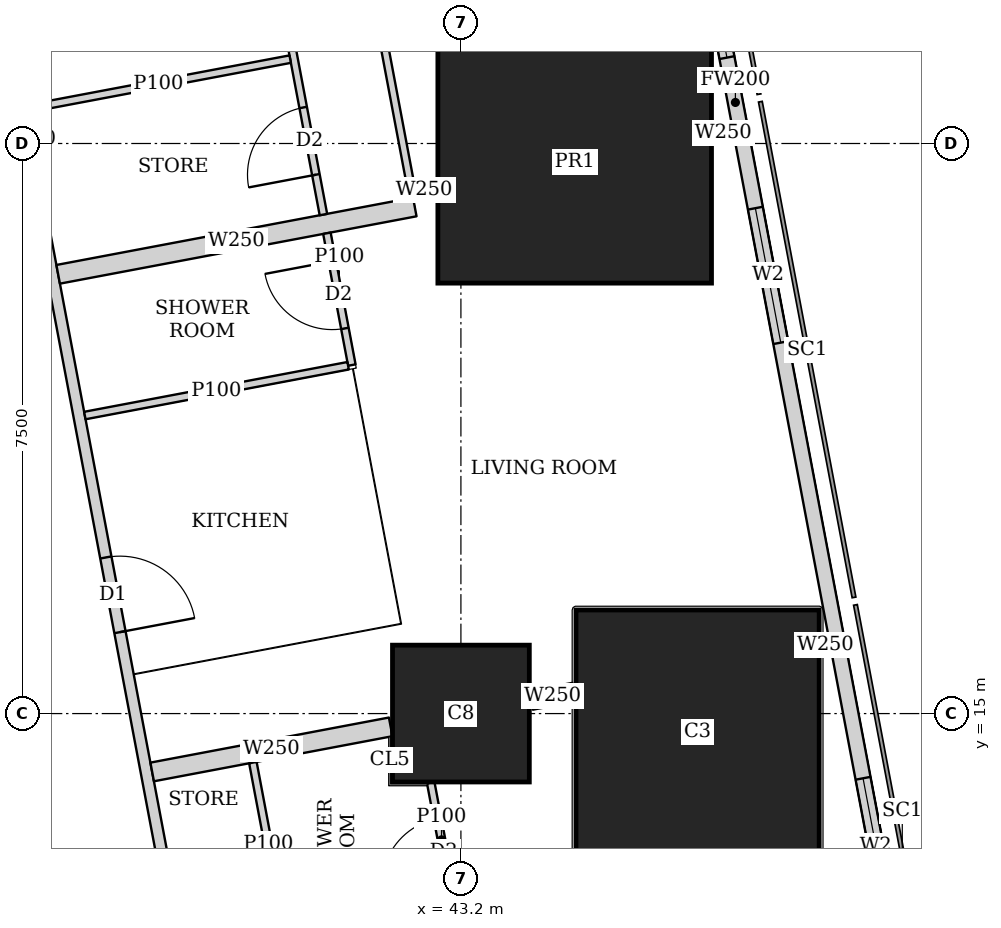
"""IFC4 building model, lengths in metres.
Left out: names, types, materials, properties, quantities, classifications, styles, units other than length and angle.
Written with IfcOpenShell. Run it as: python <this file> out.ifc"""

import sys

from ifc_helpers import new_model, si_unit, direction, frame, frame_2d, origin, origin_2d, place, context, subcontext, project, spatial, rectangle, extrude, element, fill, save


model = new_model("IFC4")
c1 = context("Model", 3, precision=1e-05, world=origin(), true_north=direction((0.0, 1.0)))
c2 = subcontext(c1, "Body", "Model", "MODEL_VIEW")
j1 = project(units=[si_unit("LENGTHUNIT", "METRE"), si_unit("PLANEANGLEUNIT", "RADIAN")], contexts=[c1])
p1 = place(None, origin())
s1 = spatial("IfcSite", under=j1, at=p1, CompositionType="ELEMENT")
p2 = place(p1, origin())
s2 = spatial("IfcBuilding", under=s1, at=p2, CompositionType="ELEMENT")
p3 = place(p2, frame((0.0, 0.0, 20.0)))
s3 = spatial("IfcBuildingStorey", under=s2, at=p3, CompositionType="ELEMENT", Elevation=20.0)
p4 = place(p3, frame((43.2, 15.0, 0.0), z_axis=(0.0, 0.0, 1.0), x_axis=(1.0, 0.0, 0.0)))
e1 = element("IfcColumn", 1, at=p4, inside=s3, PredefinedType="COLUMN", context=c2, shape_type="SweptSolid", body=[
    extrude(rectangle(XDim=1.8, YDim=1.8, at=origin_2d()), origin(), (0.0, 0.0, 1.0), 3.75),
])
p5 = place(p3, frame((46.314, 14.763, 0.0), z_axis=(0.0, 0.0, 1.0), x_axis=(1.0, 0.0, 0.0)))
e2 = element("IfcColumn", 2, at=p5, inside=s3, PredefinedType="COLUMN", context=c2, shape_type="SweptSolid", body=[
    extrude(rectangle(XDim=3.2, YDim=3.2, at=origin_2d()), origin(), (0.0, 0.0, 1.0), 3.75),
])
p6 = place(p3, frame((44.697, 22.263, 0.0), z_axis=(0.0, 0.0, 1.0), x_axis=(1.0, 0.0, 0.0)))
e3 = element("IfcColumn", 3, at=p6, inside=s3, PredefinedType="COLUMN", context=c2, shape_type="SweptSolid", body=[
    extrude(rectangle(XDim=3.6, YDim=3.2, at=origin_2d()), origin(), (0.0, 0.0, 1.0), 3.75),
])
p7 = place(p3, frame((50.653, 2.703, 0.0), z_axis=(0.0, 0.0, 1.0), x_axis=(-0.185612026696, 0.982623109613, 0.0)))
e4 = element("IfcWall", 4, at=p7, inside=s3, PredefinedType="SOLIDWALL", context=c2, shape_type="SweptSolid", body=[
    extrude(rectangle(XDim=41.393, YDim=0.2, at=frame_2d((20.697, 0.0))), origin(), (0.0, 0.0, 1.0), 3.5),
])
p8 = place(p7, frame((1.633, 0.0, 0.9)))
e5 = element("IfcOpeningElement", 5, at=p8, cuts=e4, PredefinedType="OPENING", context=c2, shape_type="SweptSolid", body=[
    extrude(rectangle(XDim=1.8, YDim=1.5, at=frame_2d((0.9, 0.75))), frame((0.0, 0.11, 0.0), z_axis=(0.0, -1.0, 0.0), x_axis=(1.0, 0.0, 0.0)), (0.0, 0.0, 1.0), 0.22),
])
p9 = place(p7, frame((6.032, 0.0, 0.9)))
e6 = element("IfcOpeningElement", 6, at=p9, cuts=e4, PredefinedType="OPENING", context=c2, shape_type="SweptSolid", body=[
    extrude(rectangle(XDim=1.8, YDim=1.5, at=frame_2d((0.9, 0.75))), frame((0.0, 0.11, 0.0), z_axis=(0.0, -1.0, 0.0), x_axis=(1.0, 0.0, 0.0)), (0.0, 0.0, 1.0), 0.22),
])
p10 = place(p7, frame((9.848, 0.0, 0.9)))
e7 = element("IfcOpeningElement", 7, at=p10, cuts=e4, PredefinedType="OPENING", context=c2, shape_type="SweptSolid", body=[
    extrude(rectangle(XDim=1.8, YDim=1.5, at=frame_2d((0.9, 0.75))), frame((0.0, 0.11, 0.0), z_axis=(0.0, -1.0, 0.0), x_axis=(1.0, 0.0, 0.0)), (0.0, 0.0, 1.0), 0.22),
])
p11 = place(p7, frame((17.481, 0.0, 0.9)))
e8 = element("IfcOpeningElement", 8, at=p11, cuts=e4, PredefinedType="OPENING", context=c2, shape_type="SweptSolid", body=[
    extrude(rectangle(XDim=1.8, YDim=1.5, at=frame_2d((0.9, 0.75))), frame((0.0, 0.11, 0.0), z_axis=(0.0, -1.0, 0.0), x_axis=(1.0, 0.0, 0.0)), (0.0, 0.0, 1.0), 0.22),
])
p12 = place(p7, frame((21.297, 0.0, 0.9)))
e9 = element("IfcOpeningElement", 9, at=p12, cuts=e4, PredefinedType="OPENING", context=c2, shape_type="SweptSolid", body=[
    extrude(rectangle(XDim=1.8, YDim=1.5, at=frame_2d((0.9, 0.75))), frame((0.0, 0.11, 0.0), z_axis=(0.0, -1.0, 0.0), x_axis=(1.0, 0.0, 0.0)), (0.0, 0.0, 1.0), 0.22),
])
p13 = place(p7, frame((25.113, 0.0, 0.9)))
e10 = element("IfcOpeningElement", 10, at=p13, cuts=e4, PredefinedType="OPENING", context=c2, shape_type="SweptSolid", body=[
    extrude(rectangle(XDim=1.8, YDim=1.5, at=frame_2d((0.9, 0.75))), frame((0.0, 0.11, 0.0), z_axis=(0.0, -1.0, 0.0), x_axis=(1.0, 0.0, 0.0)), (0.0, 0.0, 1.0), 0.22),
])
p14 = place(p7, frame((28.93, 0.0, 0.9)))
e11 = element("IfcOpeningElement", 11, at=p14, cuts=e4, PredefinedType="OPENING", context=c2, shape_type="SweptSolid", body=[
    extrude(rectangle(XDim=1.8, YDim=1.5, at=frame_2d((0.9, 0.75))), frame((0.0, 0.11, 0.0), z_axis=(0.0, -1.0, 0.0), x_axis=(1.0, 0.0, 0.0)), (0.0, 0.0, 1.0), 0.22),
])
p15 = place(p7, frame((32.746, 0.0, 0.9)))
e12 = element("IfcOpeningElement", 12, at=p15, cuts=e4, PredefinedType="OPENING", context=c2, shape_type="SweptSolid", body=[
    extrude(rectangle(XDim=1.8, YDim=1.5, at=frame_2d((0.9, 0.75))), frame((0.0, 0.11, 0.0), z_axis=(0.0, -1.0, 0.0), x_axis=(1.0, 0.0, 0.0)), (0.0, 0.0, 1.0), 0.22),
])
p16 = place(p7, frame((36.481, 0.0, 0.9)))
e13 = element("IfcOpeningElement", 13, at=p16, cuts=e4, PredefinedType="OPENING", context=c2, shape_type="SweptSolid", body=[
    extrude(rectangle(XDim=1.8, YDim=1.5, at=frame_2d((0.9, 0.75))), frame((0.0, 0.11, 0.0), z_axis=(0.0, -1.0, 0.0), x_axis=(1.0, 0.0, 0.0)), (0.0, 0.0, 1.0), 0.22),
])
p17 = place(p3, frame((33.755, 42.325, 0.0), z_axis=(0.0, 0.0, 1.0), x_axis=(0.185611461091, -0.982623216453, 0.0)))
e14 = element("IfcWall", 14, at=p17, inside=s3, PredefinedType="SOLIDWALL", context=c2, shape_type="SweptSolid", body=[
    extrude(rectangle(XDim=40.241, YDim=0.15, at=frame_2d((20.121, 0.0))), origin(), (0.0, 0.0, 1.0), 2.5),
])
p18 = place(p17, frame((7.325, 0.0, 0.0)))
e15 = element("IfcOpeningElement", 15, at=p18, cuts=e14, PredefinedType="OPENING", context=c2, shape_type="SweptSolid", body=[
    extrude(rectangle(XDim=1.0, YDim=2.1, at=frame_2d((0.5, 1.05))), frame((0.0, 0.085, 0.0), z_axis=(0.0, -1.0, 0.0), x_axis=(1.0, 0.0, 0.0)), (0.0, 0.0, 1.0), 0.17),
])
p19 = place(p17, frame((11.902, 0.0, 0.0)))
e16 = element("IfcOpeningElement", 16, at=p19, cuts=e14, PredefinedType="OPENING", context=c2, shape_type="SweptSolid", body=[
    extrude(rectangle(XDim=1.0, YDim=2.1, at=frame_2d((0.5, 1.05))), frame((0.0, 0.085, 0.0), z_axis=(0.0, -1.0, 0.0), x_axis=(1.0, 0.0, 0.0)), (0.0, 0.0, 1.0), 0.17),
])
p20 = place(p17, frame((25.718, 0.0, 0.0)))
e17 = element("IfcOpeningElement", 17, at=p20, cuts=e14, PredefinedType="OPENING", context=c2, shape_type="SweptSolid", body=[
    extrude(rectangle(XDim=1.0, YDim=2.1, at=frame_2d((0.5, 1.05))), frame((0.0, 0.085, 0.0), z_axis=(0.0, -1.0, 0.0), x_axis=(1.0, 0.0, 0.0)), (0.0, 0.0, 1.0), 0.17),
])
p21 = place(p17, frame((31.788, 0.0, 0.0)))
e18 = element("IfcOpeningElement", 18, at=p21, cuts=e14, PredefinedType="OPENING", context=c2, shape_type="SweptSolid", body=[
    extrude(rectangle(XDim=1.0, YDim=2.1, at=frame_2d((0.5, 1.05))), frame((0.0, 0.085, 0.0), z_axis=(0.0, -1.0, 0.0), x_axis=(1.0, 0.0, 0.0)), (0.0, 0.0, 1.0), 0.17),
])
p22 = place(p3, frame((41.157, 29.273, 0.0), z_axis=(0.0, 0.0, 1.0), x_axis=(0.18542464283, -0.982658486877, 0.0)))
e19 = element("IfcWall", 19, at=p22, inside=s3, PredefinedType="PARTITIONING", context=c2, shape_type="SweptSolid", body=[
    extrude(rectangle(XDim=7.421, YDim=0.1, at=frame_2d((3.71, 0.0))), origin(), (0.0, 0.0, 1.0), 2.5),
])
p23 = place(p22, frame((1.4, 0.0, 0.0)))
e20 = element("IfcOpeningElement", 20, at=p23, cuts=e19, PredefinedType="OPENING", context=c2, shape_type="SweptSolid", body=[
    extrude(rectangle(XDim=0.9, YDim=2.1, at=frame_2d((0.45, 1.05))), frame((0.0, 0.06, 0.0), z_axis=(0.0, -1.0, 0.0), x_axis=(1.0, 0.0, 0.0)), (0.0, 0.0, 1.0), 0.12),
])
p24 = place(p22, frame((4.126, 0.0, 0.0)))
e21 = element("IfcOpeningElement", 21, at=p24, cuts=e19, PredefinedType="OPENING", context=c2, shape_type="SweptSolid", body=[
    extrude(rectangle(XDim=0.9, YDim=2.1, at=frame_2d((0.45, 1.05))), frame((0.0, 0.06, 0.0), z_axis=(0.0, -1.0, 0.0), x_axis=(1.0, 0.0, 0.0)), (0.0, 0.0, 1.0), 0.12),
])
p25 = place(p3, frame((39.997, 28.942, 0.0), z_axis=(0.0, 0.0, 1.0), x_axis=(0.185686318797, -0.982609073341, 0.0)))
e22 = element("IfcWall", 22, at=p25, inside=s3, PredefinedType="PARTITIONING", context=c2, shape_type="SweptSolid", body=[
    extrude(rectangle(XDim=7.508, YDim=0.1, at=frame_2d((3.754, 0.0))), origin(), (0.0, 0.0, 1.0), 2.5),
])
p26 = place(p25, frame((0.576, 0.0, 0.0)))
e23 = element("IfcOpeningElement", 23, at=p26, cuts=e22, PredefinedType="OPENING", context=c2, shape_type="SweptSolid", body=[
    extrude(rectangle(XDim=0.9, YDim=2.1, at=frame_2d((0.45, 1.05))), frame((0.0, 0.06, 0.0), z_axis=(0.0, -1.0, 0.0), x_axis=(1.0, 0.0, 0.0)), (0.0, 0.0, 1.0), 0.12),
])
p27 = place(p25, frame((4.166, 0.0, 0.0)))
e24 = element("IfcOpeningElement", 24, at=p27, cuts=e22, PredefinedType="OPENING", context=c2, shape_type="SweptSolid", body=[
    extrude(rectangle(XDim=0.9, YDim=2.1, at=frame_2d((0.45, 1.05))), frame((0.0, 0.06, 0.0), z_axis=(0.0, -1.0, 0.0), x_axis=(1.0, 0.0, 0.0)), (0.0, 0.0, 1.0), 0.12),
])
p28 = place(p25, frame((2.483, 0.0, 0.0)))
e25 = element("IfcOpeningElement", 25, at=p28, cuts=e22, PredefinedType="OPENING", context=c2, shape_type="SweptSolid", body=[
    extrude(rectangle(XDim=0.9, YDim=2.1, at=frame_2d((0.45, 1.05))), frame((0.0, 0.06, 0.0), z_axis=(0.0, -1.0, 0.0), x_axis=(1.0, 0.0, 0.0)), (0.0, 0.0, 1.0), 0.12),
])
p29 = place(p25, frame((6.074, 0.0, 0.0)))
e26 = element("IfcOpeningElement", 26, at=p29, cuts=e22, PredefinedType="OPENING", context=c2, shape_type="SweptSolid", body=[
    extrude(rectangle(XDim=0.9, YDim=2.1, at=frame_2d((0.45, 1.05))), frame((0.0, 0.06, 0.0), z_axis=(0.0, -1.0, 0.0), x_axis=(1.0, 0.0, 0.0)), (0.0, 0.0, 1.0), 0.12),
])
p30 = place(p3, frame((40.954, 23.61, 0.0), z_axis=(0.0, 0.0, 1.0), x_axis=(-0.982638553676, -0.185530247748, 0.0)))
e27 = element("IfcWall", 27, at=p30, inside=s3, PredefinedType="PARTITIONING", context=c2, shape_type="SweptSolid", body=[
    extrude(rectangle(XDim=3.525, YDim=0.1, at=frame_2d((1.763, 0.0))), origin(), (0.0, 0.0, 1.0), 2.5),
])
p31 = place(p3, frame((41.437, 21.319, 0.0), z_axis=(0.0, 0.0, 1.0), x_axis=(0.185783379659, -0.98259072652, 0.0)))
e28 = element("IfcWall", 28, at=p31, inside=s3, PredefinedType="PARTITIONING", context=c2, shape_type="SweptSolid", body=[
    extrude(rectangle(XDim=1.765, YDim=0.1, at=frame_2d((0.882, 0.0))), origin(), (0.0, 0.0, 1.0), 3.5),
])
p32 = place(p31, frame((0.374, 0.0, 0.0)))
e29 = element("IfcOpeningElement", 29, at=p32, cuts=e28, PredefinedType="OPENING", context=c2, shape_type="SweptSolid", body=[
    extrude(rectangle(XDim=0.9, YDim=2.1, at=frame_2d((0.45, 1.05))), frame((0.0, 0.06, 0.0), z_axis=(0.0, -1.0, 0.0), x_axis=(1.0, 0.0, 0.0)), (0.0, 0.0, 1.0), 0.12),
])
p33 = place(p3, frame((41.716, 19.576, 0.0), z_axis=(0.0, 0.0, 1.0), x_axis=(-0.982588017646, -0.185797706064, 0.0)))
e30 = element("IfcWall", 30, at=p33, inside=s3, PredefinedType="PARTITIONING", context=c2, shape_type="SweptSolid", body=[
    extrude(rectangle(XDim=3.525, YDim=0.1, at=frame_2d((1.763, 0.0))), origin(), (0.0, 0.0, 1.0), 3.5),
])
p34 = place(p3, frame((46.782, 22.657, 0.0), z_axis=(0.0, 0.0, 1.0), x_axis=(-0.982104607121, -0.188336243648, 0.0)))
e31 = element("IfcWall", 31, at=p34, inside=s3, PredefinedType="SOLIDWALL", context=c2, shape_type="SweptSolid", body=[
    extrude(rectangle(XDim=0.266, YDim=0.25, at=frame_2d((0.133, 0.0))), origin(), (0.0, 0.0, 1.0), 3.5),
])
p35 = place(p3, frame((42.873, 21.918, 0.0), z_axis=(0.0, 0.0, 1.0), x_axis=(-0.982431406936, -0.186624035603, 0.0)))
e32 = element("IfcWall", 32, at=p35, inside=s3, PredefinedType="SOLIDWALL", context=c2, shape_type="SweptSolid", body=[
    extrude(rectangle(XDim=0.322, YDim=0.25, at=frame_2d((0.161, 0.0))), origin(), (0.0, 0.0, 1.0), 2.5),
])
p36 = place(p3, frame((42.593, 21.665, 0.0), z_axis=(0.0, 0.0, 1.0), x_axis=(-0.982635807605, -0.185544791394, 0.0)))
e33 = element("IfcWall", 33, at=p36, inside=s3, PredefinedType="SOLIDWALL", context=c2, shape_type="SweptSolid", body=[
    extrude(rectangle(XDim=4.775, YDim=0.25, at=frame_2d((2.388, 0.0))), origin(), (0.0, 0.0, 1.0), 2.5),
])
p37 = place(p3, frame((42.803, 14.09, 0.0), z_axis=(0.0, 0.0, 1.0), x_axis=(0.185608486942, -0.982623778246, 0.0)))
e34 = element("IfcWall", 34, at=p37, inside=s3, PredefinedType="PARTITIONING", context=c2, shape_type="SweptSolid", body=[
    extrude(rectangle(XDim=1.53, YDim=0.1, at=frame_2d((0.765, 0.0))), origin(), (0.0, 0.0, 1.0), 3.5),
])
p38 = place(p37, frame((0.48, 0.0, 0.0)))
e35 = element("IfcOpeningElement", 35, at=p38, cuts=e34, PredefinedType="OPENING", context=c2, shape_type="SweptSolid", body=[
    extrude(rectangle(XDim=0.9, YDim=2.1, at=frame_2d((0.45, 1.05))), frame((0.0, 0.06, 0.0), z_axis=(0.0, -1.0, 0.0), x_axis=(1.0, 0.0, 0.0)), (0.0, 0.0, 1.0), 0.12),
])
p39 = place(p3, frame((40.463, 14.355, 0.0), z_axis=(0.0, 0.0, 1.0), x_axis=(0.185760900029, -0.98259497659, 0.0)))
e36 = element("IfcWall", 36, at=p39, inside=s3, PredefinedType="PARTITIONING", context=c2, shape_type="SweptSolid", body=[
    extrude(rectangle(XDim=2.192, YDim=0.1, at=frame_2d((1.096, 0.0))), origin(), (0.0, 0.0, 1.0), 3.5),
])
p40 = place(p3, frame((48.055, 15.917, 0.0), z_axis=(0.0, 0.0, 1.0), x_axis=(-0.98280243359, -0.184660164975, 0.0)))
e37 = element("IfcWall", 37, at=p40, inside=s3, PredefinedType="SOLIDWALL", context=c2, shape_type="SweptSolid", body=[
    extrude(rectangle(XDim=0.119, YDim=0.25, at=frame_2d((0.06, 0.0))), origin(), (0.0, 0.0, 1.0), 3.5),
])
p41 = place(p3, frame((44.69, 15.281, 0.0), z_axis=(0.0, 0.0, 1.0), x_axis=(-0.982612073204, -0.185670443513, 0.0)))
e38 = element("IfcWall", 38, at=p41, inside=s3, PredefinedType="SOLIDWALL", context=c2, shape_type="SweptSolid", body=[
    extrude(rectangle(XDim=0.576, YDim=0.25, at=frame_2d((0.288, 0.0))), origin(), (0.0, 0.0, 1.0), 2.05),
])
p42 = place(p3, frame((42.276, 14.825, 0.0), z_axis=(0.0, 0.0, 1.0), x_axis=(-0.982607211054, -0.185696173318, 0.0)))
e39 = element("IfcWall", 39, at=p42, inside=s3, PredefinedType="SOLIDWALL", context=c2, shape_type="SweptSolid", body=[
    extrude(rectangle(XDim=3.194, YDim=0.25, at=frame_2d((1.597, 0.0))), origin(), (0.0, 0.0, 1.0), 3.5),
])
p43 = place(p3, frame((37.9, 10.413, 0.0), z_axis=(0.0, 0.0, 1.0), x_axis=(-0.185527510388, 0.982639070508, 0.0)))
e40 = element("IfcWall", 40, at=p43, inside=s3, PredefinedType="PARTITIONING", context=c2, shape_type="SweptSolid", body=[
    extrude(rectangle(XDim=5.056, YDim=0.125, at=frame_2d((2.528, 0.0))), origin(), (0.0, 0.0, 1.0), 3.5),
])
p44 = place(p43, frame((0.708, 0.0, 0.0)))
e41 = element("IfcOpeningElement", 41, at=p44, cuts=e40, PredefinedType="OPENING", context=c2, shape_type="SweptSolid", body=[
    extrude(rectangle(XDim=1.0, YDim=2.1, at=frame_2d((0.5, 1.05))), frame((0.0, 0.073, 0.0), z_axis=(0.0, -1.0, 0.0), x_axis=(1.0, 0.0, 0.0)), (0.0, 0.0, 1.0), 0.145),
])
p45 = place(p10, origin())
e42 = element("IfcWindow", 42, at=p45, inside=s3, PartitioningType="SINGLE_PANEL", PredefinedType="WINDOW", context=c2, shape_type="SweptSolid", body=[
    extrude(rectangle(XDim=1.8, YDim=1.5, at=frame_2d((0.9, 0.75))), frame((0.0, 0.03, 0.0), z_axis=(0.0, -1.0, 0.0), x_axis=(1.0, 0.0, 0.0)), (0.0, 0.0, 1.0), 0.06),
])
fill(e7, e42)
p46 = place(p11, origin())
e43 = element("IfcWindow", 43, at=p46, inside=s3, PartitioningType="SINGLE_PANEL", PredefinedType="WINDOW", context=c2, shape_type="SweptSolid", body=[
    extrude(rectangle(XDim=1.8, YDim=1.5, at=frame_2d((0.9, 0.75))), frame((0.0, 0.03, 0.0), z_axis=(0.0, -1.0, 0.0), x_axis=(1.0, 0.0, 0.0)), (0.0, 0.0, 1.0), 0.06),
])
fill(e8, e43)
p47 = place(p12, origin())
e44 = element("IfcWindow", 44, at=p47, inside=s3, PartitioningType="SINGLE_PANEL", PredefinedType="WINDOW", context=c2, shape_type="SweptSolid", body=[
    extrude(rectangle(XDim=1.8, YDim=1.5, at=frame_2d((0.9, 0.75))), frame((0.0, 0.03, 0.0), z_axis=(0.0, -1.0, 0.0), x_axis=(1.0, 0.0, 0.0)), (0.0, 0.0, 1.0), 0.06),
])
fill(e9, e44)
p48 = place(p29, origin())
e45 = element("IfcDoor", 45, at=p48, inside=s3, OperationType="SINGLE_SWING_LEFT", PredefinedType="DOOR", context=c2, shape_type="SweptSolid", body=[
    extrude(rectangle(XDim=0.9, YDim=2.1, at=frame_2d((0.45, 1.05))), frame((0.0, 0.025, 0.0), z_axis=(0.0, -1.0, 0.0), x_axis=(1.0, 0.0, 0.0)), (0.0, 0.0, 1.0), 0.05),
])
fill(e26, e45)
p49 = place(p32, origin())
e46 = element("IfcDoor", 46, at=p49, inside=s3, OperationType="SINGLE_SWING_RIGHT", PredefinedType="DOOR", context=c2, shape_type="SweptSolid", body=[
    extrude(rectangle(XDim=0.9, YDim=2.1, at=frame_2d((0.45, 1.05))), frame((0.0, 0.025, 0.0), z_axis=(0.0, -1.0, 0.0), x_axis=(1.0, 0.0, 0.0)), (0.0, 0.0, 1.0), 0.05),
])
fill(e29, e46)
p50 = place(p20, origin())
e47 = element("IfcDoor", 47, at=p50, inside=s3, OperationType="SINGLE_SWING_RIGHT", PredefinedType="DOOR", context=c2, shape_type="SweptSolid", body=[
    extrude(rectangle(XDim=1.0, YDim=2.1, at=frame_2d((0.5, 1.05))), frame((0.0, 0.025, 0.0), z_axis=(0.0, -1.0, 0.0), x_axis=(1.0, 0.0, 0.0)), (0.0, 0.0, 1.0), 0.05),
])
fill(e17, e47)
p51 = place(p38, origin())
e48 = element("IfcDoor", 48, at=p51, inside=s3, OperationType="SINGLE_SWING_LEFT", PredefinedType="DOOR", context=c2, shape_type="SweptSolid", body=[
    extrude(rectangle(XDim=0.9, YDim=2.1, at=frame_2d((0.45, 1.05))), frame((0.0, 0.025, 0.0), z_axis=(0.0, -1.0, 0.0), x_axis=(1.0, 0.0, 0.0)), (0.0, 0.0, 1.0), 0.05),
])
fill(e35, e48)
save(model, sys.argv[1])
